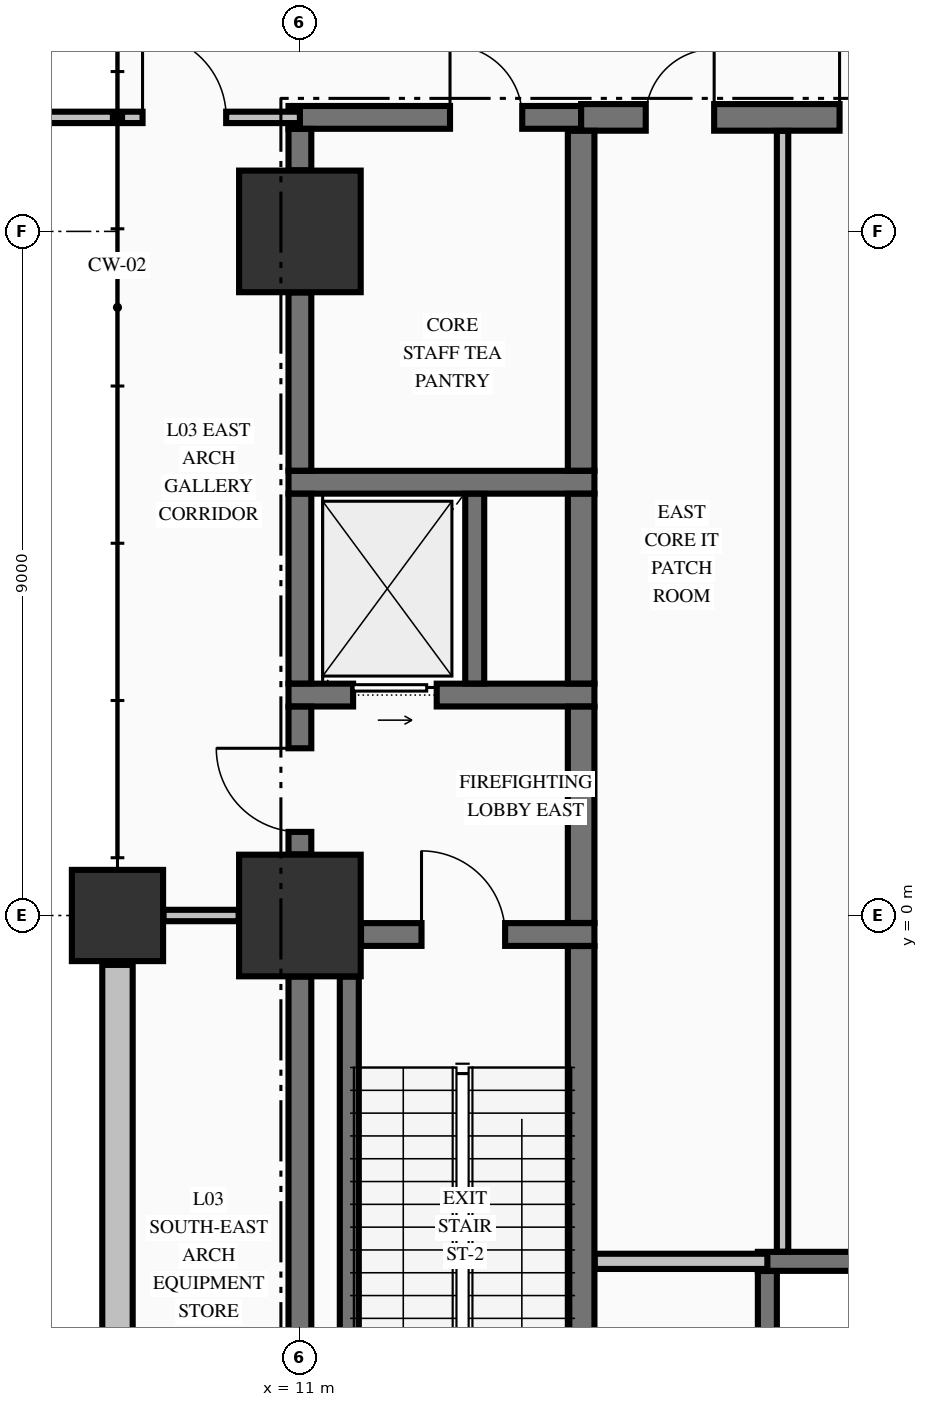
"""IFC4 building model, lengths in metres.
Left out: names, types, materials, properties, quantities, classifications, styles, units other than length and angle.
Written with IfcOpenShell. Run it as: python <this file> out.ifc"""

import sys

from ifc_helpers import new_model, si_unit, direction, frame, frame_2d, origin, origin_2d, place, context, subcontext, project, spatial, rectangle, extrude, element, fill, save


model = new_model("IFC4")
c1 = context("Model", 3, precision=1e-05, world=origin(), true_north=direction((0.0, 1.0)))
c2 = subcontext(c1, "Body", "Model", "MODEL_VIEW")
j1 = project(units=[si_unit("LENGTHUNIT", "METRE"), si_unit("PLANEANGLEUNIT", "RADIAN")], contexts=[c1])
p1 = place(None, origin())
s1 = spatial("IfcSite", under=j1, at=p1, CompositionType="ELEMENT")
p2 = place(p1, origin())
s2 = spatial("IfcBuilding", under=s1, at=p2, CompositionType="ELEMENT")
p3 = place(p2, frame((0.0, 0.0, 16.32)))
s3 = spatial("IfcBuildingStorey", under=s2, at=p3, CompositionType="ELEMENT", Elevation=16.32)
for number, where, z_axis, x_axis in (
    (1, (11.0, 0.0, 0.0), (0.0, 0.0, 1.0), (1.0, 0.0, 0.0)),
    (2, (11.0, 9.0, 0.0), (0.0, 0.0, 1.0), (1.0, 0.0, 0.0)),
):
    element("IfcColumn", number, at=place(p3, frame(where, z_axis=z_axis, x_axis=x_axis)), inside=s3, PredefinedType="COLUMN", context=c2, shape_type="SweptSolid", body=[
        extrude(rectangle(XDim=1.6, YDim=1.6, at=origin_2d()), origin(), (0.0, 0.0, 1.0), 4.99),
    ])
p4 = place(p3, frame((8.6, 0.0, 0.0), z_axis=(0.0, 0.0, 1.0), x_axis=(1.0, 0.0, 0.0)))
e3 = element("IfcColumn", 3, at=p4, inside=s3, PredefinedType="COLUMN", context=c2, shape_type="SweptSolid", body=[
    extrude(rectangle(XDim=1.2, YDim=1.2, at=origin_2d()), origin(), (0.0, 0.0, 1.0), 4.99),
])
p5 = place(p3, frame((8.6, -0.65, 0.0), z_axis=(0.0, 0.0, 1.0), x_axis=(0.0, -1.0, 0.0)))
e4 = element("IfcWall", 4, at=p5, inside=s3, PredefinedType="STANDARD", context=c2, shape_type="SweptSolid", body=[
    extrude(rectangle(XDim=24.72, YDim=0.4, at=frame_2d((12.36, 0.0))), origin(), (0.0, 0.0, 1.0), 2.582),
])
p6 = place(p3, frame((17.025, -4.55, 0.0), z_axis=(0.0, 0.0, 1.0), x_axis=(1.0, 0.0, 0.0)))
e5 = element("IfcWall", 5, at=p6, inside=s3, PredefinedType="SOLIDWALL", context=c2, shape_type="SweptSolid", body=[
    extrude(rectangle(XDim=3.15, YDim=0.25, at=frame_2d((1.575, 0.0))), origin(), (0.0, 0.0, 1.0), 4.99),
])
p7 = place(p3, frame((11.804, -0.25, 0.0), z_axis=(0.0, 0.0, 1.0), x_axis=(1.0, 0.0, 0.0)))
e6 = element("IfcWall", 6, at=p7, inside=s3, PredefinedType="SHEAR", context=c2, shape_type="SweptSolid", body=[
    extrude(rectangle(XDim=3.071, YDim=0.3, at=frame_2d((1.536, 0.0))), origin(), (0.0, 0.0, 1.0), 4.99),
])
p8 = place(p7, frame((0.796, 0.0, 0.0)))
e7 = element("IfcOpeningElement", 7, at=p8, cuts=e6, PredefinedType="OPENING", context=c2, shape_type="SweptSolid", body=[
    extrude(rectangle(XDim=1.1, YDim=2.15, at=frame_2d((0.55, 1.075))), frame((0.0, 0.16, 0.0), z_axis=(0.0, -1.0, 0.0), x_axis=(1.0, 0.0, 0.0)), (0.0, 0.0, 1.0), 0.32),
])
p9 = place(p3, frame((10.85, 2.9, 0.0), z_axis=(0.0, 0.0, 1.0), x_axis=(1.0, 0.0, 0.0)))
e8 = element("IfcWall", 8, at=p9, inside=s3, PredefinedType="SHEAR", context=c2, shape_type="SweptSolid", body=[
    extrude(rectangle(XDim=4.025, YDim=0.3, at=frame_2d((2.012, 0.0))), origin(), (0.0, 0.0, 1.0), 4.99),
])
p10 = place(p9, frame((0.85, 0.0, 0.0)))
e9 = element("IfcOpeningElement", 9, at=p10, cuts=e8, PredefinedType="OPENING", context=c2, shape_type="SweptSolid", body=[
    extrude(rectangle(XDim=1.1, YDim=2.2, at=frame_2d((0.55, 1.1))), frame((0.0, 0.16, 0.0), z_axis=(0.0, -1.0, 0.0), x_axis=(1.0, 0.0, 0.0)), (0.0, 0.0, 1.0), 0.32),
])
p11 = place(p3, frame((10.85, 5.7, 0.0), z_axis=(0.0, 0.0, 1.0), x_axis=(1.0, 0.0, 0.0)))
e10 = element("IfcWall", 10, at=p11, inside=s3, PredefinedType="SHEAR", context=c2, shape_type="SweptSolid", body=[
    extrude(rectangle(XDim=4.025, YDim=0.3, at=frame_2d((2.012, 0.0))), origin(), (0.0, 0.0, 1.0), 4.99),
])
p12 = place(p3, frame((10.85, 10.5, 0.0), z_axis=(0.0, 0.0, 1.0), x_axis=(1.0, 0.0, 0.0)))
e11 = element("IfcWall", 11, at=p12, inside=s3, PredefinedType="SHEAR", context=c2, shape_type="SweptSolid", body=[
    extrude(rectangle(XDim=3.85, YDim=0.3, at=frame_2d((1.925, 0.0))), origin(), (0.0, 0.0, 1.0), 4.99),
])
p13 = place(p12, frame((2.125, 0.0, 0.0)))
e12 = element("IfcOpeningElement", 12, at=p13, cuts=e11, PredefinedType="OPENING", context=c2, shape_type="SweptSolid", body=[
    extrude(rectangle(XDim=0.95, YDim=2.15, at=frame_2d((0.475, 1.075))), frame((0.0, 0.16, 0.0), z_axis=(0.0, -1.0, 0.0), x_axis=(1.0, 0.0, 0.0)), (0.0, 0.0, 1.0), 0.32),
])
p14 = place(p3, frame((14.7, 10.5, 0.0), z_axis=(0.0, 0.0, 1.0), x_axis=(1.0, 0.0, 0.0)))
e13 = element("IfcWall", 13, at=p14, inside=s3, PredefinedType="SHEAR", context=c2, shape_type="SweptSolid", body=[
    extrude(rectangle(XDim=5.475, YDim=0.35, at=frame_2d((2.738, 0.0))), origin(), (0.0, 0.0, 1.0), 4.99),
])
p15 = place(p14, frame((0.85, 0.0, 0.0)))
e14 = element("IfcOpeningElement", 14, at=p15, cuts=e13, PredefinedType="OPENING", context=c2, shape_type="SweptSolid", body=[
    extrude(rectangle(XDim=0.9, YDim=2.15, at=frame_2d((0.45, 1.075))), frame((0.0, 0.185, 0.0), z_axis=(0.0, -1.0, 0.0), x_axis=(1.0, 0.0, 0.0)), (0.0, 0.0, 1.0), 0.37),
])
p16 = place(p14, frame((3.4, 0.0, 0.0)))
e15 = element("IfcOpeningElement", 15, at=p16, cuts=e13, PredefinedType="OPENING", context=c2, shape_type="SweptSolid", body=[
    extrude(rectangle(XDim=0.9, YDim=2.15, at=frame_2d((0.45, 1.075))), frame((0.0, 0.185, 0.0), z_axis=(0.0, -1.0, 0.0), x_axis=(1.0, 0.0, 0.0)), (0.0, 0.0, 1.0), 0.37),
])
p17 = place(p3, frame((14.878, -4.55, 0.0), z_axis=(0.0, 0.0, 1.0), x_axis=(1.0, 0.0, 0.0)))
e16 = element("IfcWall", 16, at=p17, inside=s3, PredefinedType="PARTITIONING", context=c2, shape_type="SweptSolid", body=[
    extrude(rectangle(XDim=2.272, YDim=0.2, at=frame_2d((1.136, 0.0))), origin(), (0.0, 0.0, 1.0), 4.99),
])
p18 = place(p3, frame((9.206, 0.0, 0.0), z_axis=(0.0, 0.0, 1.0), x_axis=(1.0, 0.0, 0.0)))
e17 = element("IfcWall", 17, at=p18, inside=s3, PredefinedType="PARTITIONING", context=c2, shape_type="SweptSolid", body=[
    extrude(rectangle(XDim=0.988, YDim=0.15, at=frame_2d((0.494, 0.0))), origin(), (0.0, 0.0, 1.0), 3.332),
])
p19 = place(p3, frame((-8.54, 10.5, 0.0), z_axis=(0.0, 0.0, 1.0), x_axis=(1.0, 0.0, 0.0)))
e18 = element("IfcWall", 18, at=p19, inside=s3, PredefinedType="PARTITIONING", context=c2, shape_type="SweptSolid", body=[
    extrude(rectangle(XDim=17.08, YDim=0.15, at=frame_2d((8.54, 0.0))), origin(), (0.0, 0.0, 1.0), 4.99),
])
p20 = place(p3, frame((8.66, 10.5, 0.0), z_axis=(0.0, 0.0, 1.0), x_axis=(1.0, 0.0, 0.0)))
e19 = element("IfcWall", 19, at=p20, inside=s3, PredefinedType="PARTITIONING", context=c2, shape_type="SweptSolid", body=[
    extrude(rectangle(XDim=2.34, YDim=0.15, at=frame_2d((1.17, 0.0))), origin(), (0.0, 0.0, 1.0), 4.99),
])
p21 = place(p20, frame((0.27, 0.0, 0.0)))
e20 = element("IfcOpeningElement", 20, at=p21, cuts=e19, PredefinedType="OPENING", context=c2, shape_type="SweptSolid", body=[
    extrude(rectangle(XDim=1.1, YDim=2.15, at=frame_2d((0.55, 1.075))), frame((0.0, 0.085, 0.0), z_axis=(0.0, -1.0, 0.0), x_axis=(1.0, 0.0, 0.0)), (0.0, 0.0, 1.0), 0.17),
])
p22 = place(p3, frame((11.0, -8.196, 0.0), z_axis=(0.0, 0.0, 1.0), x_axis=(0.0, 1.0, 0.0)))
e21 = element("IfcWall", 21, at=p22, inside=s3, PredefinedType="SHEAR", context=c2, shape_type="SweptSolid", body=[
    extrude(rectangle(XDim=7.392, YDim=0.3, at=frame_2d((3.696, 0.0))), origin(), (0.0, 0.0, 1.0), 4.99),
])
p23 = place(p3, frame((11.0, 0.804, 0.0), z_axis=(0.0, 0.0, 1.0), x_axis=(0.0, 1.0, 0.0)))
e22 = element("IfcWall", 22, at=p23, inside=s3, PredefinedType="SHEAR", context=c2, shape_type="SweptSolid", body=[
    extrude(rectangle(XDim=1.944, YDim=0.3, at=frame_2d((0.972, 0.0))), origin(), (0.0, 0.0, 1.0), 4.99),
])
p24 = place(p23, frame((0.296, 0.0, 0.0)))
e23 = element("IfcOpeningElement", 23, at=p24, cuts=e22, PredefinedType="OPENING", context=c2, shape_type="SweptSolid", body=[
    extrude(rectangle(XDim=1.1, YDim=2.15, at=frame_2d((0.55, 1.075))), frame((0.0, 0.16, 0.0), z_axis=(0.0, -1.0, 0.0), x_axis=(1.0, 0.0, 0.0)), (0.0, 0.0, 1.0), 0.32),
])
p25 = place(p3, frame((11.0, 3.052, 0.0), z_axis=(0.0, 0.0, 1.0), x_axis=(0.0, 1.0, 0.0)))
e24 = element("IfcWall", 24, at=p25, inside=s3, PredefinedType="SHEAR", context=c2, shape_type="SweptSolid", body=[
    extrude(rectangle(XDim=2.496, YDim=0.3, at=frame_2d((1.248, 0.0))), origin(), (0.0, 0.0, 1.0), 4.99),
])
p26 = place(p3, frame((11.0, 5.852, 0.0), z_axis=(0.0, 0.0, 1.0), x_axis=(0.0, 1.0, 0.0)))
e25 = element("IfcWall", 25, at=p26, inside=s3, PredefinedType="SHEAR", context=c2, shape_type="SweptSolid", body=[
    extrude(rectangle(XDim=2.344, YDim=0.3, at=frame_2d((1.172, 0.0))), origin(), (0.0, 0.0, 1.0), 4.99),
])
p27 = place(p3, frame((11.0, 9.804, 0.0), z_axis=(0.0, 0.0, 1.0), x_axis=(0.0, 1.0, 0.0)))
e26 = element("IfcWall", 26, at=p27, inside=s3, PredefinedType="SHEAR", context=c2, shape_type="SweptSolid", body=[
    extrude(rectangle(XDim=0.544, YDim=0.3, at=frame_2d((0.272, 0.0))), origin(), (0.0, 0.0, 1.0), 4.99),
])
p28 = place(p3, frame((11.65, -8.196, 0.0), z_axis=(0.0, 0.0, 1.0), x_axis=(0.0, 1.0, 0.0)))
e27 = element("IfcWall", 27, at=p28, inside=s3, PredefinedType="SOLIDWALL", context=c2, shape_type="SweptSolid", body=[
    extrude(rectangle(XDim=7.392, YDim=0.25, at=frame_2d((3.696, 0.0))), origin(), (0.0, 0.0, 1.0), 4.99),
])
p29 = place(p3, frame((13.3, 3.052, 0.0), z_axis=(0.0, 0.0, 1.0), x_axis=(0.0, 1.0, 0.0)))
e28 = element("IfcWall", 28, at=p29, inside=s3, PredefinedType="SOLIDWALL", context=c2, shape_type="SweptSolid", body=[
    extrude(rectangle(XDim=2.496, YDim=0.25, at=frame_2d((1.248, 0.0))), origin(), (0.0, 0.0, 1.0), 4.99),
])
p30 = place(p3, frame((14.7, -9.773, 0.0), z_axis=(0.0, 0.0, 1.0), x_axis=(0.0, 1.0, 0.0)))
e29 = element("IfcWall", 29, at=p30, inside=s3, PredefinedType="SHEAR", context=c2, shape_type="SweptSolid", body=[
    extrude(rectangle(XDim=9.371, YDim=0.35, at=frame_2d((4.686, 0.0))), origin(), (0.0, 0.0, 1.0), 4.99),
])
p31 = place(p3, frame((14.7, -0.098, 0.0), z_axis=(0.0, 0.0, 1.0), x_axis=(0.0, 1.0, 0.0)))
e30 = element("IfcWall", 30, at=p31, inside=s3, PredefinedType="SHEAR", context=c2, shape_type="SweptSolid", body=[
    extrude(rectangle(XDim=2.846, YDim=0.35, at=frame_2d((1.423, 0.0))), origin(), (0.0, 0.0, 1.0), 4.99),
])
p32 = place(p3, frame((14.7, 3.052, 0.0), z_axis=(0.0, 0.0, 1.0), x_axis=(0.0, 1.0, 0.0)))
e31 = element("IfcWall", 31, at=p32, inside=s3, PredefinedType="SHEAR", context=c2, shape_type="SweptSolid", body=[
    extrude(rectangle(XDim=2.496, YDim=0.35, at=frame_2d((1.248, 0.0))), origin(), (0.0, 0.0, 1.0), 4.99),
])
p33 = place(p3, frame((14.7, 5.852, 0.0), z_axis=(0.0, 0.0, 1.0), x_axis=(0.0, 1.0, 0.0)))
e32 = element("IfcWall", 32, at=p33, inside=s3, PredefinedType="SHEAR", context=c2, shape_type="SweptSolid", body=[
    extrude(rectangle(XDim=4.471, YDim=0.35, at=frame_2d((2.235, 0.0))), origin(), (0.0, 0.0, 1.0), 4.99),
])
p34 = place(p3, frame((17.15, -6.923, 0.0), z_axis=(0.0, 0.0, 1.0), x_axis=(0.0, 1.0, 0.0)))
e33 = element("IfcWall", 33, at=p34, inside=s3, PredefinedType="SOLIDWALL", context=c2, shape_type="SweptSolid", body=[
    extrude(rectangle(XDim=2.246, YDim=0.25, at=frame_2d((1.123, 0.0))), origin(), (0.0, 0.0, 1.0), 4.99),
])
p35 = place(p3, frame((17.35, -4.422, 0.0), z_axis=(0.0, 0.0, 1.0), x_axis=(0.0, 1.0, 0.0)))
e34 = element("IfcWall", 34, at=p35, inside=s3, PredefinedType="PARTITIONING", context=c2, shape_type="SweptSolid", body=[
    extrude(rectangle(XDim=14.744, YDim=0.15, at=frame_2d((7.372, 0.0))), origin(), (0.0, 0.0, 1.0), 4.99),
])
p36 = place(p8, origin())
e35 = element("IfcDoor", 35, at=p36, inside=s3, OperationType="SINGLE_SWING_LEFT", PredefinedType="DOOR", context=c2, shape_type="SweptSolid", body=[
    extrude(rectangle(XDim=1.1, YDim=2.15, at=frame_2d((0.55, 1.075))), frame((0.0, 0.025, 0.0), z_axis=(0.0, -1.0, 0.0), x_axis=(1.0, 0.0, 0.0)), (0.0, 0.0, 1.0), 0.05),
])
fill(e7, e35)
p37 = place(p24, origin())
e36 = element("IfcDoor", 36, at=p37, inside=s3, OperationType="SINGLE_SWING_RIGHT", PredefinedType="DOOR", context=c2, shape_type="SweptSolid", body=[
    extrude(rectangle(XDim=1.1, YDim=2.15, at=frame_2d((0.55, 1.075))), frame((0.0, 0.025, 0.0), z_axis=(0.0, -1.0, 0.0), x_axis=(1.0, 0.0, 0.0)), (0.0, 0.0, 1.0), 0.05),
])
fill(e23, e36)
p38 = place(p10, origin())
e37 = element("IfcDoor", 37, at=p38, inside=s3, OperationType="SLIDING_TO_RIGHT", PredefinedType="DOOR", context=c2, shape_type="SweptSolid", body=[
    extrude(rectangle(XDim=1.1, YDim=2.2, at=frame_2d((0.55, 1.1))), frame((0.0, 0.025, 0.0), z_axis=(0.0, -1.0, 0.0), x_axis=(1.0, 0.0, 0.0)), (0.0, 0.0, 1.0), 0.05),
])
fill(e9, e37)
p39 = place(p13, origin())
e38 = element("IfcDoor", 38, at=p39, inside=s3, OperationType="SINGLE_SWING_LEFT", PredefinedType="DOOR", context=c2, shape_type="SweptSolid", body=[
    extrude(rectangle(XDim=0.95, YDim=2.15, at=frame_2d((0.475, 1.075))), frame((0.0, 0.025, 0.0), z_axis=(0.0, -1.0, 0.0), x_axis=(1.0, 0.0, 0.0)), (0.0, 0.0, 1.0), 0.05),
])
fill(e12, e38)
p40 = place(p15, origin())
e39 = element("IfcDoor", 39, at=p40, inside=s3, OperationType="SINGLE_SWING_RIGHT", PredefinedType="DOOR", context=c2, shape_type="SweptSolid", body=[
    extrude(rectangle(XDim=0.9, YDim=2.15, at=frame_2d((0.45, 1.075))), frame((0.0, 0.025, 0.0), z_axis=(0.0, -1.0, 0.0), x_axis=(1.0, 0.0, 0.0)), (0.0, 0.0, 1.0), 0.05),
])
fill(e14, e39)
p41 = place(p16, origin())
e40 = element("IfcDoor", 40, at=p41, inside=s3, OperationType="SINGLE_SWING_LEFT", PredefinedType="DOOR", context=c2, shape_type="SweptSolid", body=[
    extrude(rectangle(XDim=0.9, YDim=2.15, at=frame_2d((0.45, 1.075))), frame((0.0, 0.025, 0.0), z_axis=(0.0, -1.0, 0.0), x_axis=(1.0, 0.0, 0.0)), (0.0, 0.0, 1.0), 0.05),
])
fill(e15, e40)
p42 = place(p21, origin())
e41 = element("IfcDoor", 41, at=p42, inside=s3, OperationType="SINGLE_SWING_LEFT", PredefinedType="DOOR", context=c2, shape_type="SweptSolid", body=[
    extrude(rectangle(XDim=1.1, YDim=2.15, at=frame_2d((0.55, 1.075))), frame((0.0, 0.025, 0.0), z_axis=(0.0, -1.0, 0.0), x_axis=(1.0, 0.0, 0.0)), (0.0, 0.0, 1.0), 0.05),
])
fill(e20, e41)
save(model, sys.argv[1])
